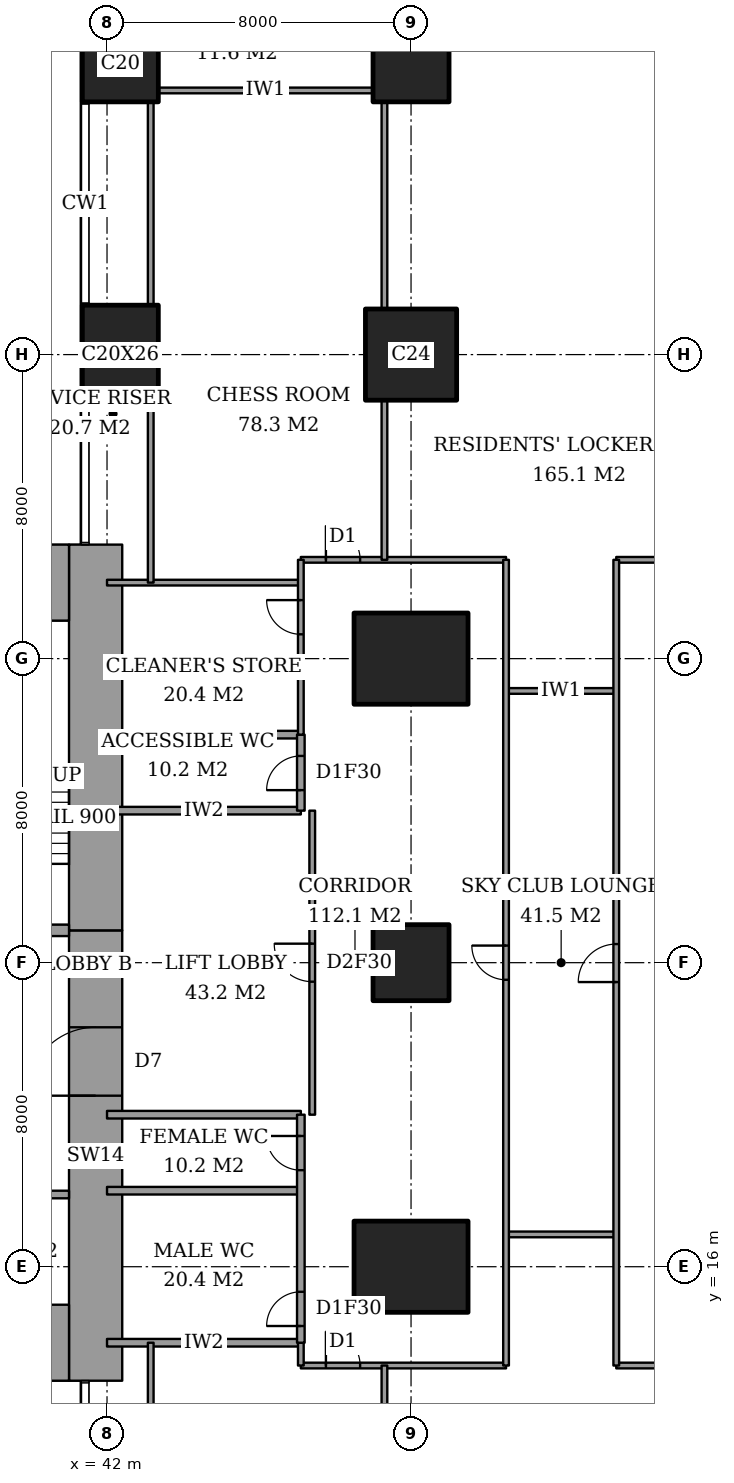
"""IFC4 building model, lengths in metres.
Left out: names, types, materials, properties, quantities, classifications, styles, units other than length and angle.
Written with IfcOpenShell. Run it as: python <this file> out.ifc"""

import sys

from ifc_helpers import new_model, si_unit, direction, frame, frame_2d, origin, origin_2d, place, context, subcontext, project, spatial, rectangle, extrude, element, fill, save


model = new_model("IFC4")
c1 = context("Model", 3, precision=1e-05, world=origin(), true_north=direction((0.0, 1.0)))
c2 = subcontext(c1, "Body", "Model", "MODEL_VIEW")
j1 = project(units=[si_unit("LENGTHUNIT", "METRE"), si_unit("PLANEANGLEUNIT", "RADIAN")], contexts=[c1])
p1 = place(None, origin())
s1 = spatial("IfcSite", under=j1, at=p1, CompositionType="ELEMENT")
p2 = place(p1, origin())
s2 = spatial("IfcBuilding", under=s1, at=p2, CompositionType="ELEMENT")
p3 = place(p2, frame((0.0, 0.0, 132.2)))
s3 = spatial("IfcBuildingStorey", under=s2, at=p3, CompositionType="ELEMENT", Elevation=132.2)
p4 = place(p3, frame((42.35, 40.0, 0.0), z_axis=(0.0, 0.0, 1.0), x_axis=(1.0, 0.0, 0.0)))
e1 = element("IfcColumn", 1, at=p4, inside=s3, PredefinedType="COLUMN", context=c2, shape_type="SweptSolid", body=[
    extrude(rectangle(XDim=2.0, YDim=2.6, at=origin_2d()), origin(), (0.0, 0.0, 1.0), 3.6),
])
p5 = place(p3, frame((42.35, 47.65, 0.0), z_axis=(0.0, 0.0, 1.0), x_axis=(1.0, 0.0, 0.0)))
e2 = element("IfcColumn", 2, at=p5, inside=s3, PredefinedType="COLUMN", context=c2, shape_type="SweptSolid", body=[
    extrude(rectangle(XDim=2.0, YDim=2.0, at=origin_2d()), origin(), (0.0, 0.0, 1.0), 3.6),
])
p6 = place(p3, frame((50.0, 16.0, 0.0), z_axis=(0.0, 0.0, 1.0), x_axis=(1.0, 0.0, 0.0)))
e3 = element("IfcColumn", 3, at=p6, inside=s3, PredefinedType="COLUMN", context=c2, shape_type="SweptSolid", body=[
    extrude(rectangle(XDim=3.0, YDim=2.4, at=origin_2d()), origin(), (0.0, 0.0, 1.0), 3.6),
])
p7 = place(p3, frame((50.0, 24.0, 0.0), z_axis=(0.0, 0.0, 1.0), x_axis=(1.0, 0.0, 0.0)))
e4 = element("IfcColumn", 4, at=p7, inside=s3, PredefinedType="COLUMN", context=c2, shape_type="SweptSolid", body=[
    extrude(rectangle(XDim=2.0, YDim=2.0, at=origin_2d()), origin(), (0.0, 0.0, 1.0), 3.6),
])
p8 = place(p3, frame((50.0, 32.0, 0.0), z_axis=(0.0, 0.0, 1.0), x_axis=(1.0, 0.0, 0.0)))
e5 = element("IfcColumn", 5, at=p8, inside=s3, PredefinedType="COLUMN", context=c2, shape_type="SweptSolid", body=[
    extrude(rectangle(XDim=3.0, YDim=2.4, at=origin_2d()), origin(), (0.0, 0.0, 1.0), 3.6),
])
p9 = place(p3, frame((50.0, 40.0, 0.0), z_axis=(0.0, 0.0, 1.0), x_axis=(1.0, 0.0, 0.0)))
e6 = element("IfcColumn", 6, at=p9, inside=s3, PredefinedType="COLUMN", context=c2, shape_type="SweptSolid", body=[
    extrude(rectangle(XDim=2.4, YDim=2.4, at=origin_2d()), origin(), (0.0, 0.0, 1.0), 3.6),
])
p10 = place(p3, frame((50.0, 47.65, 0.0), z_axis=(0.0, 0.0, 1.0), x_axis=(1.0, 0.0, 0.0)))
e7 = element("IfcColumn", 7, at=p10, inside=s3, PredefinedType="COLUMN", context=c2, shape_type="SweptSolid", body=[
    extrude(rectangle(XDim=2.0, YDim=2.0, at=origin_2d()), origin(), (0.0, 0.0, 1.0), 3.6),
])
for number, where, z_axis, x_axis in (
    (8, (37.85, 14.0, 0.0), (0.0, 0.0, 1.0), (1.0, 0.0, 0.0)),
    (9, (37.85, 34.0, 0.0), (0.0, 0.0, 1.0), (1.0, 0.0, 0.0)),
):
    element("IfcWall", number, at=place(p3, frame(where, z_axis=z_axis, x_axis=x_axis)), inside=s3, PredefinedType="SHEAR", context=c2, shape_type="SweptSolid", body=[
        extrude(rectangle(XDim=3.15, YDim=2.0, at=frame_2d((1.575, 0.0))), origin(), (0.0, 0.0, 1.0), 3.6),
    ])
p11 = place(p3, frame((41.7, 13.0, 0.0), z_axis=(0.0, 0.0, 1.0), x_axis=(0.0, 1.0, 0.0)))
e10 = element("IfcWall", 10, at=p11, inside=s3, PredefinedType="SHEAR", context=c2, shape_type="SweptSolid", body=[
    extrude(rectangle(XDim=11.85, YDim=1.4, at=frame_2d((5.925, 0.0))), origin(), (0.0, 0.0, 1.0), 3.6),
])
p12 = place(p11, frame((7.5, 0.0, 0.0)))
e11 = element("IfcOpeningElement", 11, at=p12, cuts=e10, PredefinedType="OPENING", context=c2, shape_type="SweptSolid", body=[
    extrude(rectangle(XDim=1.8, YDim=2.4, at=frame_2d((0.9, 1.2))), frame((0.0, 0.71, 0.0), z_axis=(0.0, -1.0, 0.0), x_axis=(1.0, 0.0, 0.0)), (0.0, 0.0, 1.0), 1.42),
])
p13 = place(p3, frame((41.7, 24.85, 0.0), z_axis=(0.0, 0.0, 1.0), x_axis=(0.0, 1.0, 0.0)))
e12 = element("IfcWall", 12, at=p13, inside=s3, PredefinedType="SHEAR", context=c2, shape_type="SweptSolid", body=[
    extrude(rectangle(XDim=10.15, YDim=1.4, at=frame_2d((5.075, 0.0))), origin(), (0.0, 0.0, 1.0), 3.6),
])
p14 = place(p3, frame((37.85, 24.85, 0.0), z_axis=(0.0, 0.0, 1.0), x_axis=(1.0, 0.0, 0.0)))
e13 = element("IfcWall", 13, at=p14, inside=s3, PredefinedType="SHEAR", context=c2, shape_type="SweptSolid", body=[
    extrude(rectangle(XDim=3.15, YDim=0.3, at=frame_2d((1.575, 0.0))), origin(), (0.0, 0.0, 1.0), 3.6),
])
p15 = place(p14, frame((0.65, 0.0, 0.0)))
e14 = element("IfcOpeningElement", 14, at=p15, cuts=e13, PredefinedType="OPENING", context=c2, shape_type="SweptSolid", body=[
    extrude(rectangle(XDim=1.6, YDim=2.1, at=frame_2d((0.8, 1.05))), frame((0.0, 0.16, 0.0), z_axis=(0.0, -1.0, 0.0), x_axis=(1.0, 0.0, 0.0)), (0.0, 0.0, 1.0), 0.32),
])
p16 = place(p3, frame((47.1, 13.4, 0.0), z_axis=(0.0, 0.0, 1.0), x_axis=(1.0, 0.0, 0.0)))
e15 = element("IfcWall", 15, at=p16, inside=s3, PredefinedType="PARTITIONING", context=c2, shape_type="SweptSolid", body=[
    extrude(rectangle(XDim=5.4, YDim=0.15, at=frame_2d((2.7, 0.0))), origin(), (0.0, 0.0, 1.0), 3.35),
])
p17 = place(p16, frame((0.66, 0.0, 0.0)))
e16 = element("IfcOpeningElement", 16, at=p17, cuts=e15, PredefinedType="OPENING", context=c2, shape_type="SweptSolid", body=[
    extrude(rectangle(XDim=0.9, YDim=2.1, at=frame_2d((0.45, 1.05))), frame((0.0, 0.085, 0.0), z_axis=(0.0, -1.0, 0.0), x_axis=(1.0, 0.0, 0.0)), (0.0, 0.0, 1.0), 0.17),
])
p18 = place(p3, frame((55.4, 13.4, 0.0), z_axis=(0.0, 0.0, 1.0), x_axis=(1.0, 0.0, 0.0)))
e17 = element("IfcWall", 17, at=p18, inside=s3, PredefinedType="PARTITIONING", context=c2, shape_type="SweptSolid", body=[
    extrude(rectangle(XDim=11.161, YDim=0.15, at=frame_2d((5.581, 0.0))), origin(), (0.0, 0.0, 1.0), 3.35),
])
p19 = place(p18, frame((6.88, 0.0, 0.0)))
e18 = element("IfcOpeningElement", 18, at=p19, cuts=e17, PredefinedType="OPENING", context=c2, shape_type="SweptSolid", body=[
    extrude(rectangle(XDim=0.9, YDim=2.1, at=frame_2d((0.45, 1.05))), frame((0.0, 0.085, 0.0), z_axis=(0.0, -1.0, 0.0), x_axis=(1.0, 0.0, 0.0)), (0.0, 0.0, 1.0), 0.17),
])
p20 = place(p3, frame((42.0, 14.0, 0.0), z_axis=(0.0, 0.0, 1.0), x_axis=(1.0, 0.0, 0.0)))
e19 = element("IfcWall", 19, at=p20, inside=s3, PredefinedType="PARTITIONING", context=c2, shape_type="SweptSolid", body=[
    extrude(rectangle(XDim=5.1, YDim=0.2, at=frame_2d((2.55, 0.0))), origin(), (0.0, 0.0, 1.0), 3.35),
])
p21 = place(p3, frame((52.5, 16.85, 0.0), z_axis=(0.0, 0.0, 1.0), x_axis=(1.0, 0.0, 0.0)))
e20 = element("IfcWall", 20, at=p21, inside=s3, PredefinedType="PARTITIONING", context=c2, shape_type="SweptSolid", body=[
    extrude(rectangle(XDim=2.9, YDim=0.15, at=frame_2d((1.45, 0.0))), origin(), (0.0, 0.0, 1.0), 3.35),
])
for number, where, z_axis, x_axis in (
    (21, (42.0, 18.0, 0.0), (0.0, 0.0, 1.0), (1.0, 0.0, 0.0)),
    (22, (42.0, 20.0, 0.0), (0.0, 0.0, 1.0), (1.0, 0.0, 0.0)),
    (23, (42.0, 28.0, 0.0), (0.0, 0.0, 1.0), (1.0, 0.0, 0.0)),
    (24, (42.0, 30.0, 0.0), (0.0, 0.0, 1.0), (1.0, 0.0, 0.0)),
):
    element("IfcWall", number, at=place(p3, frame(where, z_axis=z_axis, x_axis=x_axis)), inside=s3, PredefinedType="PARTITIONING", context=c2, shape_type="SweptSolid", body=[
        extrude(rectangle(XDim=5.1, YDim=0.2, at=frame_2d((2.55, 0.0))), origin(), (0.0, 0.0, 1.0), 3.35),
    ])
p22 = place(p3, frame((52.5, 31.15, 0.0), z_axis=(0.0, 0.0, 1.0), x_axis=(1.0, 0.0, 0.0)))
e25 = element("IfcWall", 25, at=p22, inside=s3, PredefinedType="PARTITIONING", context=c2, shape_type="SweptSolid", body=[
    extrude(rectangle(XDim=2.9, YDim=0.15, at=frame_2d((1.45, 0.0))), origin(), (0.0, 0.0, 1.0), 3.35),
])
p23 = place(p3, frame((42.0, 34.0, 0.0), z_axis=(0.0, 0.0, 1.0), x_axis=(1.0, 0.0, 0.0)))
e26 = element("IfcWall", 26, at=p23, inside=s3, PredefinedType="PARTITIONING", context=c2, shape_type="SweptSolid", body=[
    extrude(rectangle(XDim=5.1, YDim=0.15, at=frame_2d((2.55, 0.0))), origin(), (0.0, 0.0, 1.0), 3.35),
])
p24 = place(p3, frame((47.1, 34.6, 0.0), z_axis=(0.0, 0.0, 1.0), x_axis=(1.0, 0.0, 0.0)))
e27 = element("IfcWall", 27, at=p24, inside=s3, PredefinedType="PARTITIONING", context=c2, shape_type="SweptSolid", body=[
    extrude(rectangle(XDim=5.4, YDim=0.15, at=frame_2d((2.7, 0.0))), origin(), (0.0, 0.0, 1.0), 3.35),
])
p25 = place(p24, frame((0.66, 0.0, 0.0)))
e28 = element("IfcOpeningElement", 28, at=p25, cuts=e27, PredefinedType="OPENING", context=c2, shape_type="SweptSolid", body=[
    extrude(rectangle(XDim=0.9, YDim=2.1, at=frame_2d((0.45, 1.05))), frame((0.0, 0.085, 0.0), z_axis=(0.0, -1.0, 0.0), x_axis=(1.0, 0.0, 0.0)), (0.0, 0.0, 1.0), 0.17),
])
p26 = place(p3, frame((55.4, 34.6, 0.0), z_axis=(0.0, 0.0, 1.0), x_axis=(1.0, 0.0, 0.0)))
e29 = element("IfcWall", 29, at=p26, inside=s3, PredefinedType="PARTITIONING", context=c2, shape_type="SweptSolid", body=[
    extrude(rectangle(XDim=11.161, YDim=0.15, at=frame_2d((5.581, 0.0))), origin(), (0.0, 0.0, 1.0), 3.35),
])
p27 = place(p26, frame((6.88, 0.0, 0.0)))
e30 = element("IfcOpeningElement", 30, at=p27, cuts=e29, PredefinedType="OPENING", context=c2, shape_type="SweptSolid", body=[
    extrude(rectangle(XDim=0.9, YDim=2.1, at=frame_2d((0.45, 1.05))), frame((0.0, 0.085, 0.0), z_axis=(0.0, -1.0, 0.0), x_axis=(1.0, 0.0, 0.0)), (0.0, 0.0, 1.0), 0.17),
])
p28 = place(p3, frame((43.35, 46.95, 0.0), z_axis=(0.0, 0.0, 1.0), x_axis=(1.0, 0.0, 0.0)))
e31 = element("IfcWall", 31, at=p28, inside=s3, PredefinedType="PARTITIONING", context=c2, shape_type="SweptSolid", body=[
    extrude(rectangle(XDim=5.65, YDim=0.15, at=frame_2d((2.825, 0.0))), origin(), (0.0, 0.0, 1.0), 3.35),
])
for number, where, z_axis, x_axis in (
    (32, (43.15, 9.3, 0.0), (0.0, 0.0, 1.0), (0.0, 1.0, 0.0)),
    (33, (43.15, 34.0, 0.0), (0.0, 0.0, 1.0), (0.0, 1.0, 0.0)),
):
    element("IfcWall", number, at=place(p3, frame(where, z_axis=z_axis, x_axis=x_axis)), inside=s3, PredefinedType="PARTITIONING", context=c2, shape_type="SweptSolid", body=[
        extrude(rectangle(XDim=4.7, YDim=0.15, at=frame_2d((2.35, 0.0))), origin(), (0.0, 0.0, 1.0), 3.35),
    ])
p29 = place(p3, frame((43.15, 41.3, 0.0), z_axis=(0.0, 0.0, 1.0), x_axis=(0.0, 1.0, 0.0)))
e34 = element("IfcWall", 34, at=p29, inside=s3, PredefinedType="PARTITIONING", context=c2, shape_type="SweptSolid", body=[
    extrude(rectangle(XDim=5.35, YDim=0.15, at=frame_2d((2.675, 0.0))), origin(), (0.0, 0.0, 1.0), 3.35),
])
p30 = place(p3, frame((47.1, 14.0, 0.0), z_axis=(0.0, 0.0, 1.0), x_axis=(0.0, 1.0, 0.0)))
e35 = element("IfcWall", 35, at=p30, inside=s3, PredefinedType="PARTITIONING", context=c2, shape_type="SweptSolid", body=[
    extrude(rectangle(XDim=6.0, YDim=0.2, at=frame_2d((3.0, 0.0))), origin(), (0.0, 0.0, 1.0), 3.35),
])
p31 = place(p30, frame((0.44, 0.0, 0.0)))
e36 = element("IfcOpeningElement", 36, at=p31, cuts=e35, PredefinedType="OPENING", context=c2, shape_type="SweptSolid", body=[
    extrude(rectangle(XDim=0.9, YDim=2.1, at=frame_2d((0.45, 1.05))), frame((0.0, 0.11, 0.0), z_axis=(0.0, -1.0, 0.0), x_axis=(1.0, 0.0, 0.0)), (0.0, 0.0, 1.0), 0.22),
])
p32 = place(p30, frame((4.54, 0.0, 0.0)))
e37 = element("IfcOpeningElement", 37, at=p32, cuts=e35, PredefinedType="OPENING", context=c2, shape_type="SweptSolid", body=[
    extrude(rectangle(XDim=0.9, YDim=2.1, at=frame_2d((0.45, 1.05))), frame((0.0, 0.11, 0.0), z_axis=(0.0, -1.0, 0.0), x_axis=(1.0, 0.0, 0.0)), (0.0, 0.0, 1.0), 0.22),
])
p33 = place(p3, frame((47.1, 28.0, 0.0), z_axis=(0.0, 0.0, 1.0), x_axis=(0.0, 1.0, 0.0)))
e38 = element("IfcWall", 38, at=p33, inside=s3, PredefinedType="PARTITIONING", context=c2, shape_type="SweptSolid", body=[
    extrude(rectangle(XDim=2.0, YDim=0.2, at=frame_2d((1.0, 0.0))), origin(), (0.0, 0.0, 1.0), 3.35),
])
p34 = place(p33, frame((0.54, 0.0, 0.0)))
e39 = element("IfcOpeningElement", 39, at=p34, cuts=e38, PredefinedType="OPENING", context=c2, shape_type="SweptSolid", body=[
    extrude(rectangle(XDim=0.9, YDim=2.1, at=frame_2d((0.45, 1.05))), frame((0.0, 0.11, 0.0), z_axis=(0.0, -1.0, 0.0), x_axis=(1.0, 0.0, 0.0)), (0.0, 0.0, 1.0), 0.22),
])
p35 = place(p3, frame((47.1, 13.4, 0.0), z_axis=(0.0, 0.0, 1.0), x_axis=(0.0, 1.0, 0.0)))
e40 = element("IfcWall", 40, at=p35, inside=s3, PredefinedType="PARTITIONING", context=c2, shape_type="SweptSolid", body=[
    extrude(rectangle(XDim=0.6, YDim=0.15, at=frame_2d((0.3, 0.0))), origin(), (0.0, 0.0, 1.0), 3.35),
])
p36 = place(p3, frame((47.1, 30.0, 0.0), z_axis=(0.0, 0.0, 1.0), x_axis=(0.0, 1.0, 0.0)))
e41 = element("IfcWall", 41, at=p36, inside=s3, PredefinedType="PARTITIONING", context=c2, shape_type="SweptSolid", body=[
    extrude(rectangle(XDim=4.6, YDim=0.15, at=frame_2d((2.3, 0.0))), origin(), (0.0, 0.0, 1.0), 3.35),
])
p37 = place(p36, frame((2.64, 0.0, 0.0)))
e42 = element("IfcOpeningElement", 42, at=p37, cuts=e41, PredefinedType="OPENING", context=c2, shape_type="SweptSolid", body=[
    extrude(rectangle(XDim=0.9, YDim=2.1, at=frame_2d((0.45, 1.05))), frame((0.0, 0.085, 0.0), z_axis=(0.0, -1.0, 0.0), x_axis=(1.0, 0.0, 0.0)), (0.0, 0.0, 1.0), 0.17),
])
p38 = place(p3, frame((47.4, 20.0, 0.0), z_axis=(0.0, 0.0, 1.0), x_axis=(0.0, 1.0, 0.0)))
e43 = element("IfcWall", 43, at=p38, inside=s3, PredefinedType="PARTITIONING", context=c2, shape_type="SweptSolid", body=[
    extrude(rectangle(XDim=8.0, YDim=0.15, at=frame_2d((4.0, 0.0))), origin(), (0.0, 0.0, 1.0), 3.35),
])
p39 = place(p38, frame((3.5, 0.0, 0.0)))
e44 = element("IfcOpeningElement", 44, at=p39, cuts=e43, PredefinedType="OPENING", context=c2, shape_type="SweptSolid", body=[
    extrude(rectangle(XDim=1.0, YDim=2.1, at=frame_2d((0.5, 1.05))), frame((0.0, 0.085, 0.0), z_axis=(0.0, -1.0, 0.0), x_axis=(1.0, 0.0, 0.0)), (0.0, 0.0, 1.0), 0.17),
])
for number, where, z_axis, x_axis in (
    (45, (49.3, 9.2, 0.0), (0.0, 0.0, 1.0), (0.0, 1.0, 0.0)),
    (46, (49.3, 34.6, 0.0), (0.0, 0.0, 1.0), (0.0, 1.0, 0.0)),
):
    element("IfcWall", number, at=place(p3, frame(where, z_axis=z_axis, x_axis=x_axis)), inside=s3, PredefinedType="PARTITIONING", context=c2, shape_type="SweptSolid", body=[
        extrude(rectangle(XDim=4.2, YDim=0.15, at=frame_2d((2.1, 0.0))), origin(), (0.0, 0.0, 1.0), 3.35),
    ])
p40 = place(p3, frame((49.3, 41.2, 0.0), z_axis=(0.0, 0.0, 1.0), x_axis=(0.0, 1.0, 0.0)))
e47 = element("IfcWall", 47, at=p40, inside=s3, PredefinedType="PARTITIONING", context=c2, shape_type="SweptSolid", body=[
    extrude(rectangle(XDim=5.45, YDim=0.15, at=frame_2d((2.725, 0.0))), origin(), (0.0, 0.0, 1.0), 3.35),
])
p41 = place(p3, frame((52.5, 13.4, 0.0), z_axis=(0.0, 0.0, 1.0), x_axis=(0.0, 1.0, 0.0)))
e48 = element("IfcWall", 48, at=p41, inside=s3, PredefinedType="PARTITIONING", context=c2, shape_type="SweptSolid", body=[
    extrude(rectangle(XDim=21.2, YDim=0.15, at=frame_2d((10.6, 0.0))), origin(), (0.0, 0.0, 1.0), 3.35),
])
p42 = place(p41, frame((10.15, 0.0, 0.0)))
e49 = element("IfcOpeningElement", 49, at=p42, cuts=e48, PredefinedType="OPENING", context=c2, shape_type="SweptSolid", body=[
    extrude(rectangle(XDim=0.9, YDim=2.1, at=frame_2d((0.45, 1.05))), frame((0.0, 0.085, 0.0), z_axis=(0.0, -1.0, 0.0), x_axis=(1.0, 0.0, 0.0)), (0.0, 0.0, 1.0), 0.17),
])
p43 = place(p3, frame((55.4, 13.4, 0.0), z_axis=(0.0, 0.0, 1.0), x_axis=(0.0, 1.0, 0.0)))
e50 = element("IfcWall", 50, at=p43, inside=s3, PredefinedType="PARTITIONING", context=c2, shape_type="SweptSolid", body=[
    extrude(rectangle(XDim=21.2, YDim=0.15, at=frame_2d((10.6, 0.0))), origin(), (0.0, 0.0, 1.0), 3.35),
])
p44 = place(p43, frame((10.09, 0.0, 0.0)))
e51 = element("IfcOpeningElement", 51, at=p44, cuts=e50, PredefinedType="OPENING", context=c2, shape_type="SweptSolid", body=[
    extrude(rectangle(XDim=1.0, YDim=2.1, at=frame_2d((0.5, 1.05))), frame((0.0, 0.085, 0.0), z_axis=(0.0, -1.0, 0.0), x_axis=(1.0, 0.0, 0.0)), (0.0, 0.0, 1.0), 0.17),
])
p45 = place(p3, frame((28.3, 17.9, 0.0), z_axis=(0.0, 0.0, 1.0), x_axis=(1.0, 0.0, 0.0)))
e52 = element("IfcWall", 52, at=p45, inside=s3, PredefinedType="PARTITIONING", context=c2, shape_type="SweptSolid", body=[
    extrude(rectangle(XDim=12.7, YDim=0.2, at=frame_2d((6.35, 0.0))), origin(), (0.0, 0.0, 1.0), 3.6),
])
p46 = place(p45, frame((0.95, 0.0, 0.0)))
e53 = element("IfcOpeningElement", 53, at=p46, cuts=e52, PredefinedType="OPENING", context=c2, shape_type="SweptSolid", body=[
    extrude(rectangle(XDim=1.1, YDim=2.1, at=frame_2d((0.55, 1.05))), frame((0.0, 0.11, 0.0), z_axis=(0.0, -1.0, 0.0), x_axis=(1.0, 0.0, 0.0)), (0.0, 0.0, 1.0), 0.22),
])
p47 = place(p45, frame((4.15, 0.0, 0.0)))
e54 = element("IfcOpeningElement", 54, at=p47, cuts=e52, PredefinedType="OPENING", context=c2, shape_type="SweptSolid", body=[
    extrude(rectangle(XDim=1.1, YDim=2.1, at=frame_2d((0.55, 1.05))), frame((0.0, 0.11, 0.0), z_axis=(0.0, -1.0, 0.0), x_axis=(1.0, 0.0, 0.0)), (0.0, 0.0, 1.0), 0.22),
])
p48 = place(p45, frame((7.35, 0.0, 0.0)))
e55 = element("IfcOpeningElement", 55, at=p48, cuts=e52, PredefinedType="OPENING", context=c2, shape_type="SweptSolid", body=[
    extrude(rectangle(XDim=1.1, YDim=2.1, at=frame_2d((0.55, 1.05))), frame((0.0, 0.11, 0.0), z_axis=(0.0, -1.0, 0.0), x_axis=(1.0, 0.0, 0.0)), (0.0, 0.0, 1.0), 0.22),
])
p49 = place(p45, frame((10.6, 0.0, 0.0)))
e56 = element("IfcOpeningElement", 56, at=p49, cuts=e52, PredefinedType="OPENING", context=c2, shape_type="SweptSolid", body=[
    extrude(rectangle(XDim=1.2, YDim=2.1, at=frame_2d((0.6, 1.05))), frame((0.0, 0.11, 0.0), z_axis=(0.0, -1.0, 0.0), x_axis=(1.0, 0.0, 0.0)), (0.0, 0.0, 1.0), 0.22),
])
p50 = place(p44, origin())
e57 = element("IfcDoor", 57, at=p50, inside=s3, OperationType="SINGLE_SWING_RIGHT", PredefinedType="DOOR", context=c2, shape_type="SweptSolid", body=[
    extrude(rectangle(XDim=1.0, YDim=2.1, at=frame_2d((0.5, 1.05))), frame((0.0, 0.025, 0.0), z_axis=(0.0, -1.0, 0.0), x_axis=(1.0, 0.0, 0.0)), (0.0, 0.0, 1.0), 0.05),
])
fill(e51, e57)
p51 = place(p42, origin())
e58 = element("IfcDoor", 58, at=p51, inside=s3, OperationType="SINGLE_SWING_LEFT", PredefinedType="DOOR", context=c2, shape_type="SweptSolid", body=[
    extrude(rectangle(XDim=0.9, YDim=2.1, at=frame_2d((0.45, 1.05))), frame((0.0, 0.025, 0.0), z_axis=(0.0, -1.0, 0.0), x_axis=(1.0, 0.0, 0.0)), (0.0, 0.0, 1.0), 0.05),
])
fill(e49, e58)
p52 = place(p39, origin())
e59 = element("IfcDoor", 59, at=p52, inside=s3, OperationType="SINGLE_SWING_LEFT", PredefinedType="DOOR", context=c2, shape_type="SweptSolid", body=[
    extrude(rectangle(XDim=1.0, YDim=2.1, at=frame_2d((0.5, 1.05))), frame((0.0, 0.025, 0.0), z_axis=(0.0, -1.0, 0.0), x_axis=(1.0, 0.0, 0.0)), (0.0, 0.0, 1.0), 0.05),
])
fill(e44, e59)
p53 = place(p31, origin())
e60 = element("IfcDoor", 60, at=p53, inside=s3, OperationType="SINGLE_SWING_RIGHT", PredefinedType="DOOR", context=c2, shape_type="SweptSolid", body=[
    extrude(rectangle(XDim=0.9, YDim=2.1, at=frame_2d((0.45, 1.05))), frame((0.0, 0.025, 0.0), z_axis=(0.0, -1.0, 0.0), x_axis=(1.0, 0.0, 0.0)), (0.0, 0.0, 1.0), 0.05),
])
fill(e36, e60)
p54 = place(p32, origin())
e61 = element("IfcDoor", 61, at=p54, inside=s3, OperationType="SINGLE_SWING_LEFT", PredefinedType="DOOR", context=c2, shape_type="SweptSolid", body=[
    extrude(rectangle(XDim=0.9, YDim=2.1, at=frame_2d((0.45, 1.05))), frame((0.0, 0.025, 0.0), z_axis=(0.0, -1.0, 0.0), x_axis=(1.0, 0.0, 0.0)), (0.0, 0.0, 1.0), 0.05),
])
fill(e37, e61)
p55 = place(p34, origin())
e62 = element("IfcDoor", 62, at=p55, inside=s3, OperationType="SINGLE_SWING_RIGHT", PredefinedType="DOOR", context=c2, shape_type="SweptSolid", body=[
    extrude(rectangle(XDim=0.9, YDim=2.1, at=frame_2d((0.45, 1.05))), frame((0.0, 0.025, 0.0), z_axis=(0.0, -1.0, 0.0), x_axis=(1.0, 0.0, 0.0)), (0.0, 0.0, 1.0), 0.05),
])
fill(e39, e62)
p56 = place(p37, origin())
e63 = element("IfcDoor", 63, at=p56, inside=s3, OperationType="SINGLE_SWING_LEFT", PredefinedType="DOOR", context=c2, shape_type="SweptSolid", body=[
    extrude(rectangle(XDim=0.9, YDim=2.1, at=frame_2d((0.45, 1.05))), frame((0.0, 0.025, 0.0), z_axis=(0.0, -1.0, 0.0), x_axis=(1.0, 0.0, 0.0)), (0.0, 0.0, 1.0), 0.05),
])
fill(e42, e63)
p57 = place(p17, origin())
e64 = element("IfcDoor", 64, at=p57, inside=s3, OperationType="SINGLE_SWING_RIGHT", PredefinedType="DOOR", context=c2, shape_type="SweptSolid", body=[
    extrude(rectangle(XDim=0.9, YDim=2.1, at=frame_2d((0.45, 1.05))), frame((0.0, 0.025, 0.0), z_axis=(0.0, -1.0, 0.0), x_axis=(1.0, 0.0, 0.0)), (0.0, 0.0, 1.0), 0.05),
])
fill(e16, e64)
p58 = place(p25, origin())
e65 = element("IfcDoor", 65, at=p58, inside=s3, OperationType="SINGLE_SWING_RIGHT", PredefinedType="DOOR", context=c2, shape_type="SweptSolid", body=[
    extrude(rectangle(XDim=0.9, YDim=2.1, at=frame_2d((0.45, 1.05))), frame((0.0, 0.025, 0.0), z_axis=(0.0, -1.0, 0.0), x_axis=(1.0, 0.0, 0.0)), (0.0, 0.0, 1.0), 0.05),
])
fill(e28, e65)
p59 = place(p12, origin())
e66 = element("IfcDoor", 66, at=p59, inside=s3, OperationType="DOUBLE_DOOR_DOUBLE_SWING", PredefinedType="DOOR", context=c2, shape_type="SweptSolid", body=[
    extrude(rectangle(XDim=1.8, YDim=2.4, at=frame_2d((0.9, 1.2))), frame((0.0, 0.025, 0.0), z_axis=(0.0, -1.0, 0.0), x_axis=(1.0, 0.0, 0.0)), (0.0, 0.0, 1.0), 0.05),
])
fill(e11, e66)
save(model, sys.argv[1])
